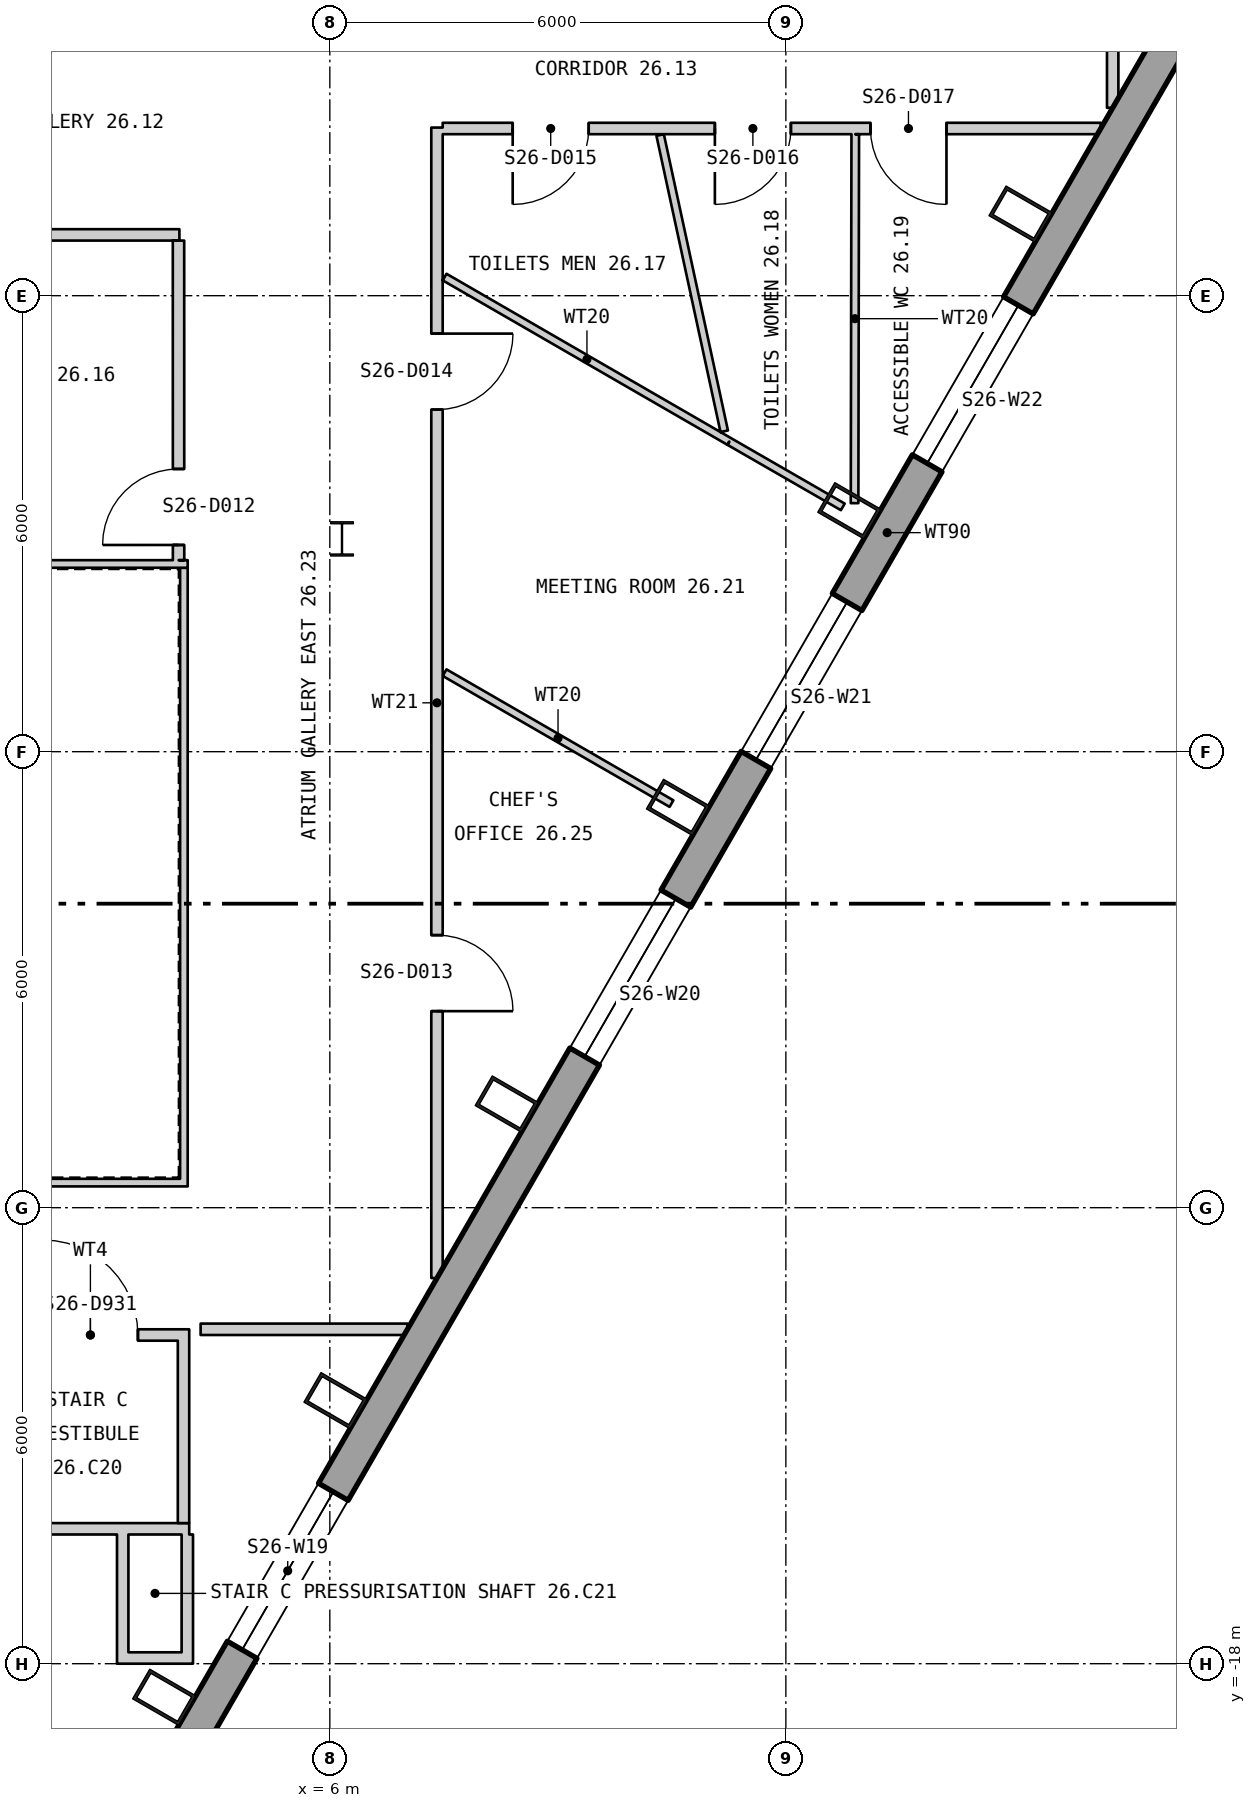
"""IFC4 building model, lengths in metres.
Left out: names, types, materials, properties, quantities, classifications, styles, units other than length and angle.
Written with IfcOpenShell. Run it as: python <this file> out.ifc"""

import sys

from ifc_helpers import new_model, si_unit, direction, frame, frame_2d, origin, origin_2d, place, context, subcontext, project, spatial, polyline, rectangle, hollow_rectangle, i_section, outline, extrude, element, fill, save


model = new_model("IFC4")
c1 = context("Model", 3, precision=1e-05, world=origin(), true_north=direction((0.0, 1.0)))
c2 = subcontext(c1, "Body", "Model", "MODEL_VIEW")
j1 = project(units=[si_unit("LENGTHUNIT", "METRE"), si_unit("PLANEANGLEUNIT", "RADIAN")], contexts=[c1])
p1 = place(None, origin())
s1 = spatial("IfcSite", under=j1, at=p1, CompositionType="ELEMENT")
p2 = place(p1, origin())
s2 = spatial("IfcBuilding", under=s1, at=p2, CompositionType="ELEMENT")
p3 = place(p2, frame((0.0, 0.0, 329.4)))
s3 = spatial("IfcBuildingStorey", under=s2, at=p3, CompositionType="ELEMENT", Elevation=329.4)
for number, where, z_axis, x_axis in (
    (1, (3.821, -18.442, 0.0), (0.0, 0.0, 1.0), (0.5, 0.866, 0.0)),
    (2, (6.075, -14.539, 0.0), (0.0, 0.0, 1.0), (0.5, 0.866, 0.0)),
    (3, (8.328, -10.636, 0.0), (0.0, 0.0, 1.0), (0.5, 0.866, 0.0)),
    (4, (10.581, -6.733, 0.0), (0.0, 0.0, 1.0), (0.5, 0.866, 0.0)),
    (5, (12.835, -2.83, 0.0), (0.0, 0.0, 1.0), (0.5, 0.866, 0.0)),
    (6, (15.088, 1.073, 0.0), (0.0, 0.0, 1.0), (0.5, 0.866, 0.0)),
):
    element("IfcColumn", number, at=place(p3, frame(where, z_axis=z_axis, x_axis=x_axis)), inside=s3, PredefinedType="COLUMN", context=c2, shape_type="SweptSolid", body=[
        extrude(hollow_rectangle(XDim=0.45, YDim=0.7, WallThickness=0.04, at=origin_2d()), origin(), (0.0, 0.0, 1.0), 4.2),
    ])
p4 = place(p3, frame((6.16, -3.2, 0.0), z_axis=(0.0, 0.0, 1.0), x_axis=(1.0, 0.0, 0.0)))
e7 = element("IfcColumn", 7, at=p4, inside=s3, PredefinedType="COLUMN", context=c2, shape_type="SweptSolid", body=[
    extrude(i_section(OverallWidth=0.3, OverallDepth=0.45, WebThickness=0.014, FlangeThickness=0.026, at=origin_2d()), origin(), (0.0, 0.0, 1.0), 4.2),
])
p5 = place(p3, frame((1.9, -22.92, -0.18), z_axis=(0.0, 0.0, 1.0), x_axis=(0.500000141277, 0.866025322218, 0.0)))
e8 = element("IfcWall", 8, at=p5, inside=s3, PredefinedType="SOLIDWALL", context=c2, shape_type="SweptSolid", body=[
    extrude(outline(polyline([(-0.13, -0.225), (45.86, -0.225), (45.6, 0.225), (0.13, 0.225), (-0.13, -0.225)])), origin(), (0.0, 0.0, 1.0), 3.98),
])
p6 = place(p5, frame((1.424, 0.0, 1.08)))
e9 = element("IfcOpeningElement", 9, at=p6, cuts=e8, PredefinedType="OPENING", context=c2, shape_type="SweptSolid", body=[
    extrude(rectangle(XDim=2.4, YDim=2.3, at=frame_2d((1.2, 1.15))), frame((0.0, 0.235, 0.0), z_axis=(0.0, -1.0, 0.0), x_axis=(1.0, 0.0, 0.0)), (0.0, 0.0, 1.0), 0.47),
])
p7 = place(p5, frame((5.892, 0.0, 1.08)))
e10 = element("IfcOpeningElement", 10, at=p7, cuts=e8, PredefinedType="OPENING", context=c2, shape_type="SweptSolid", body=[
    extrude(rectangle(XDim=2.4, YDim=2.3, at=frame_2d((1.2, 1.15))), frame((0.0, 0.235, 0.0), z_axis=(0.0, -1.0, 0.0), x_axis=(1.0, 0.0, 0.0)), (0.0, 0.0, 1.0), 0.47),
])
p8 = place(p5, frame((14.905, 0.0, 1.08)))
e11 = element("IfcOpeningElement", 11, at=p8, cuts=e8, PredefinedType="OPENING", context=c2, shape_type="SweptSolid", body=[
    extrude(rectangle(XDim=2.4, YDim=2.3, at=frame_2d((1.2, 1.15))), frame((0.0, 0.235, 0.0), z_axis=(0.0, -1.0, 0.0), x_axis=(1.0, 0.0, 0.0)), (0.0, 0.0, 1.0), 0.47),
])
p9 = place(p5, frame((19.412, 0.0, 1.08)))
e12 = element("IfcOpeningElement", 12, at=p9, cuts=e8, PredefinedType="OPENING", context=c2, shape_type="SweptSolid", body=[
    extrude(rectangle(XDim=2.4, YDim=2.3, at=frame_2d((1.2, 1.15))), frame((0.0, 0.235, 0.0), z_axis=(0.0, -1.0, 0.0), x_axis=(1.0, 0.0, 0.0)), (0.0, 0.0, 1.0), 0.47),
])
p10 = place(p5, frame((23.918, 0.0, 1.08)))
e13 = element("IfcOpeningElement", 13, at=p10, cuts=e8, PredefinedType="OPENING", context=c2, shape_type="SweptSolid", body=[
    extrude(rectangle(XDim=2.4, YDim=2.3, at=frame_2d((1.2, 1.15))), frame((0.0, 0.235, 0.0), z_axis=(0.0, -1.0, 0.0), x_axis=(1.0, 0.0, 0.0)), (0.0, 0.0, 1.0), 0.47),
])
p11 = place(p5, frame((32.932, 0.0, 1.08)))
e14 = element("IfcOpeningElement", 14, at=p11, cuts=e8, PredefinedType="OPENING", context=c2, shape_type="SweptSolid", body=[
    extrude(rectangle(XDim=2.4, YDim=2.3, at=frame_2d((1.2, 1.15))), frame((0.0, 0.235, 0.0), z_axis=(0.0, -1.0, 0.0), x_axis=(1.0, 0.0, 0.0)), (0.0, 0.0, 1.0), 0.47),
])
p12 = place(p5, frame((37.438, 0.0, 1.08)))
e15 = element("IfcOpeningElement", 15, at=p12, cuts=e8, PredefinedType="OPENING", context=c2, shape_type="SweptSolid", body=[
    extrude(rectangle(XDim=2.4, YDim=2.3, at=frame_2d((1.2, 1.15))), frame((0.0, 0.235, 0.0), z_axis=(0.0, -1.0, 0.0), x_axis=(1.0, 0.0, 0.0)), (0.0, 0.0, 1.0), 0.47),
])
p13 = place(p5, frame((41.907, 0.0, 1.08)))
e16 = element("IfcOpeningElement", 16, at=p13, cuts=e8, PredefinedType="OPENING", context=c2, shape_type="SweptSolid", body=[
    extrude(rectangle(XDim=2.4, YDim=2.3, at=frame_2d((1.2, 1.15))), frame((0.0, 0.235, 0.0), z_axis=(0.0, -1.0, 0.0), x_axis=(1.0, 0.0, 0.0)), (0.0, 0.0, 1.0), 0.47),
])
p14 = place(p3, frame((-4.13, -11.67, 0.0), z_axis=(0.0, 0.0, 1.0), x_axis=(1.0, 0.0, 0.0)))
e17 = element("IfcWall", 17, at=p14, inside=s3, PredefinedType="PARTITIONING", context=c2, shape_type="SweptSolid", body=[
    extrude(rectangle(XDim=8.26, YDim=0.1, at=frame_2d((4.13, 0.0))), origin(), (0.0, 0.0, 1.0), 4.0),
])
p15 = place(p3, frame((4.08, -11.62, 0.0), z_axis=(0.0, 0.0, 1.0), x_axis=(0.0, 1.0, 0.0)))
e18 = element("IfcWall", 18, at=p15, inside=s3, PredefinedType="PARTITIONING", context=c2, shape_type="SweptSolid", body=[
    extrude(rectangle(XDim=8.04, YDim=0.1, at=frame_2d((4.02, 0.0))), origin(), (0.0, 0.0, 1.0), 4.0),
])
p16 = place(p3, frame((4.13, -3.53, 0.0), z_axis=(0.0, 0.0, 1.0), x_axis=(-1.0, 0.0, 0.0)))
e19 = element("IfcWall", 19, at=p16, inside=s3, PredefinedType="PARTITIONING", context=c2, shape_type="SweptSolid", body=[
    extrude(rectangle(XDim=8.26, YDim=0.1, at=frame_2d((4.13, 0.0))), origin(), (0.0, 0.0, 1.0), 4.0),
])
p17 = place(p3, frame((1.55, -16.225, 0.0), z_axis=(0.0, 0.0, 1.0), x_axis=(1.0, 0.0, 0.0)))
e20 = element("IfcWall", 20, at=p17, inside=s3, PredefinedType="PARTITIONING", context=c2, shape_type="SweptSolid", body=[
    extrude(rectangle(XDim=2.6, YDim=0.15, at=frame_2d((1.3, 0.0))), origin(), (0.0, 0.0, 1.0), 4.0),
])
p18 = place(p3, frame((4.075, -16.15, 0.0), z_axis=(0.0, 0.0, 1.0), x_axis=(0.0, 1.0, 0.0)))
e21 = element("IfcWall", 21, at=p18, inside=s3, PredefinedType="PARTITIONING", context=c2, shape_type="SweptSolid", body=[
    extrude(rectangle(XDim=2.4, YDim=0.15, at=frame_2d((1.2, 0.0))), origin(), (0.0, 0.0, 1.0), 4.0),
])
p19 = place(p3, frame((1.55, -13.675, 0.0), z_axis=(0.0, 0.0, 1.0), x_axis=(1.0, 0.0, 0.0)))
e22 = element("IfcWall", 22, at=p19, inside=s3, PredefinedType="PARTITIONING", context=c2, shape_type="SweptSolid", body=[
    extrude(rectangle(XDim=2.6, YDim=0.15, at=frame_2d((1.3, 0.0))), origin(), (0.0, 0.0, 1.0), 3.21),
])
p20 = place(p19, frame((0.675, 0.0, 0.0)))
e23 = element("IfcOpeningElement", 23, at=p20, cuts=e22, PredefinedType="OPENING", context=c2, shape_type="SweptSolid", body=[
    extrude(rectangle(XDim=1.25, YDim=2.1, at=frame_2d((0.625, 1.05))), frame((0.0, 0.085, 0.0), z_axis=(0.0, -1.0, 0.0), x_axis=(1.0, 0.0, 0.0)), (0.0, 0.0, 1.0), 0.17),
])
p21 = place(p3, frame((3.275, -18.0, 0.0), z_axis=(0.0, 0.0, 1.0), x_axis=(0.0, 1.0, 0.0)))
e24 = element("IfcWall", 24, at=p21, inside=s3, PredefinedType="PARTITIONING", context=c2, shape_type="SweptSolid", body=[
    extrude(rectangle(XDim=1.7, YDim=0.15, at=frame_2d((0.85, 0.0))), origin(), (0.0, 0.0, 1.0), 3.55),
])
p22 = place(p3, frame((3.35, -17.925, 0.0), z_axis=(0.0, 0.0, 1.0), x_axis=(1.0, 0.0, 0.0)))
e25 = element("IfcWall", 25, at=p22, inside=s3, PredefinedType="PARTITIONING", context=c2, shape_type="SweptSolid", body=[
    extrude(rectangle(XDim=0.7, YDim=0.15, at=frame_2d((0.35, 0.0))), origin(), (0.0, 0.0, 1.0), 4.0),
])
p23 = place(p3, frame((4.125, -18.0, 0.0), z_axis=(0.0, 0.0, 1.0), x_axis=(0.0, 1.0, 0.0)))
e26 = element("IfcWall", 26, at=p23, inside=s3, PredefinedType="PARTITIONING", context=c2, shape_type="SweptSolid", body=[
    extrude(rectangle(XDim=1.7, YDim=0.15, at=frame_2d((0.85, 0.0))), origin(), (0.0, 0.0, 1.0), 4.0),
])
p24 = place(p3, frame((-4.022, 0.8, 0.0), z_axis=(0.0, 0.0, 1.0), x_axis=(1.0, 0.0, 0.0)))
e27 = element("IfcWall", 27, at=p24, inside=s3, PredefinedType="PARTITIONING", context=c2, shape_type="SweptSolid", body=[
    extrude(rectangle(XDim=8.043, YDim=0.15, at=frame_2d((4.021, 0.0))), origin(), (0.0, 0.0, 1.0), 4.0),
])
p25 = place(p3, frame((4.009, 0.725, 0.0), z_axis=(0.0, 0.0, 1.0), x_axis=(0.000237812122, -0.999999971723, 0.0)))
e28 = element("IfcWall", 28, at=p25, inside=s3, PredefinedType="PARTITIONING", context=c2, shape_type="SweptSolid", body=[
    extrude(rectangle(XDim=4.205, YDim=0.15, at=frame_2d((2.103, 0.0))), origin(), (0.0, 0.0, 1.0), 4.0),
])
p26 = place(p25, frame((3.005, 0.0, 0.0)))
e29 = element("IfcOpeningElement", 29, at=p26, cuts=e28, PredefinedType="OPENING", context=c2, shape_type="SweptSolid", body=[
    extrude(rectangle(XDim=1.0, YDim=2.1, at=frame_2d((0.5, 1.05))), frame((0.0, 0.085, 0.0), z_axis=(0.0, -1.0, 0.0), x_axis=(1.0, 0.0, 0.0)), (0.0, 0.0, 1.0), 0.17),
])
p27 = place(p3, frame((4.3, -13.6, 0.0), z_axis=(0.0, 0.0, 1.0), x_axis=(1.0, 0.0, 0.0)))
e30 = element("IfcWall", 30, at=p27, inside=s3, PredefinedType="PARTITIONING", context=c2, shape_type="SweptSolid", body=[
    extrude(rectangle(XDim=2.115, YDim=0.15, at=frame_2d((1.058, 0.0))), origin(), (0.0, 0.0, 1.0), 3.21),
])
p28 = place(p3, frame((6.415, -13.6, 0.0), z_axis=(0.0, 0.0, 1.0), x_axis=(1.0, 0.0, 0.0)))
e31 = element("IfcWall", 31, at=p28, inside=s3, PredefinedType="PARTITIONING", context=c2, shape_type="SweptSolid", body=[
    extrude(rectangle(XDim=0.606, YDim=0.15, at=frame_2d((0.303, 0.0))), origin(), (0.0, 0.0, 1.0), 4.0),
])
p29 = place(p3, frame((7.41, -12.926, 0.0), z_axis=(0.0, 0.0, 1.0), x_axis=(0.0, 1.0, 0.0)))
e32 = element("IfcWall", 32, at=p29, inside=s3, PredefinedType="PARTITIONING", context=c2, shape_type="SweptSolid", body=[
    extrude(rectangle(XDim=15.138, YDim=0.15, at=frame_2d((7.569, 0.0))), origin(), (0.0, 0.0, 1.0), 4.0),
])
p30 = place(p29, frame((3.512, 0.0, 0.0)))
e33 = element("IfcOpeningElement", 33, at=p30, cuts=e32, PredefinedType="OPENING", context=c2, shape_type="SweptSolid", body=[
    extrude(rectangle(XDim=1.0, YDim=2.1, at=frame_2d((0.5, 1.05))), frame((0.0, 0.085, 0.0), z_axis=(0.0, -1.0, 0.0), x_axis=(1.0, 0.0, 0.0)), (0.0, 0.0, 1.0), 0.17),
])
p31 = place(p29, frame((11.427, 0.0, 0.0)))
e34 = element("IfcOpeningElement", 34, at=p31, cuts=e32, PredefinedType="OPENING", context=c2, shape_type="SweptSolid", body=[
    extrude(rectangle(XDim=1.0, YDim=2.1, at=frame_2d((0.5, 1.05))), frame((0.0, 0.085, 0.0), z_axis=(0.0, -1.0, 0.0), x_axis=(1.0, 0.0, 0.0)), (0.0, 0.0, 1.0), 0.17),
])
p32 = place(p3, frame((7.485, 2.2, 0.0), z_axis=(0.0, 0.0, 1.0), x_axis=(1.0, 0.0, 0.0)))
e35 = element("IfcWall", 35, at=p32, inside=s3, PredefinedType="PARTITIONING", context=c2, shape_type="SweptSolid", body=[
    extrude(rectangle(XDim=8.658, YDim=0.15, at=frame_2d((4.329, 0.0))), origin(), (0.0, 0.0, 1.0), 4.0),
])
p33 = place(p32, frame((0.921, 0.0, 0.0)))
e36 = element("IfcOpeningElement", 36, at=p33, cuts=e35, PredefinedType="OPENING", context=c2, shape_type="SweptSolid", body=[
    extrude(rectangle(XDim=1.0, YDim=2.1, at=frame_2d((0.5, 1.05))), frame((0.0, 0.085, 0.0), z_axis=(0.0, -1.0, 0.0), x_axis=(1.0, 0.0, 0.0)), (0.0, 0.0, 1.0), 0.17),
])
p34 = place(p32, frame((3.581, 0.0, 0.0)))
e37 = element("IfcOpeningElement", 37, at=p34, cuts=e35, PredefinedType="OPENING", context=c2, shape_type="SweptSolid", body=[
    extrude(rectangle(XDim=1.0, YDim=2.1, at=frame_2d((0.5, 1.05))), frame((0.0, 0.085, 0.0), z_axis=(0.0, -1.0, 0.0), x_axis=(1.0, 0.0, 0.0)), (0.0, 0.0, 1.0), 0.17),
])
p35 = place(p32, frame((5.628, 0.0, 0.0)))
e38 = element("IfcOpeningElement", 38, at=p35, cuts=e35, PredefinedType="OPENING", context=c2, shape_type="SweptSolid", body=[
    extrude(rectangle(XDim=1.0, YDim=2.1, at=frame_2d((0.5, 1.05))), frame((0.0, 0.085, 0.0), z_axis=(0.0, -1.0, 0.0), x_axis=(1.0, 0.0, 0.0)), (0.0, 0.0, 1.0), 0.17),
])
p36 = place(p3, frame((7.51, -4.96, 0.0), z_axis=(0.0, 0.0, 1.0), x_axis=(0.866074466908, -0.499915010547, 0.0)))
e39 = element("IfcWall", 39, at=p36, inside=s3, PredefinedType="PARTITIONING", context=c2, shape_type="SweptSolid", body=[
    extrude(rectangle(XDim=3.447, YDim=0.1, at=frame_2d((1.723, 0.0))), origin(), (0.0, 0.0, 1.0), 4.0),
])
p37 = place(p3, frame((7.51, 0.245, 0.0), z_axis=(0.0, 0.0, 1.0), x_axis=(0.865900672614, -0.50021597852, 0.0)))
e40 = element("IfcWall", 40, at=p37, inside=s3, PredefinedType="PARTITIONING", context=c2, shape_type="SweptSolid", body=[
    extrude(rectangle(XDim=4.326, YDim=0.1, at=frame_2d((2.163, 0.0))), origin(), (0.0, 0.0, 1.0), 4.0),
])
p38 = place(p3, frame((10.346, 2.114, 0.0), z_axis=(0.0, 0.0, 1.0), x_axis=(0.211378111895, -0.977404365558, 0.0)))
e41 = element("IfcWall", 41, at=p38, inside=s3, PredefinedType="PARTITIONING", context=c2, shape_type="SweptSolid", body=[
    extrude(rectangle(XDim=3.988, YDim=0.1, at=frame_2d((1.994, 0.0))), origin(), (0.0, 0.0, 1.0), 4.0),
])
p39 = place(p3, frame((11.256, -1.919, 0.0), z_axis=(0.0, 0.0, 1.0), x_axis=(0.866523573279, -0.499136150717, 0.0)))
e42 = element("IfcWall", 42, at=p39, inside=s3, PredefinedType="PARTITIONING", context=c2, shape_type="SweptSolid", body=[
    extrude(rectangle(XDim=1.723, YDim=0.1, at=frame_2d((0.862, 0.0))), origin(), (0.0, 0.0, 1.0), 4.0),
])
p40 = place(p3, frame((12.904, -2.73, 0.0), z_axis=(0.0, 0.0, 1.0), x_axis=(0.001853755826, 0.999998281793, 0.0)))
e43 = element("IfcWall", 43, at=p40, inside=s3, PredefinedType="PARTITIONING", context=c2, shape_type="SweptSolid", body=[
    extrude(rectangle(XDim=4.855, YDim=0.1, at=frame_2d((2.428, 0.0))), origin(), (0.0, 0.0, 1.0), 4.0),
])
p41 = place(p3, frame((16.3, 2.472, 0.0), z_axis=(0.0, 0.0, 1.0), x_axis=(0.0, 1.0, 0.0)))
e44 = element("IfcWall", 44, at=p41, inside=s3, PredefinedType="PARTITIONING", context=c2, shape_type="SweptSolid", body=[
    extrude(rectangle(XDim=17.276, YDim=0.15, at=frame_2d((8.638, 0.0))), origin(), (0.0, 0.0, 1.0), 4.0),
])
p42 = place(p41, frame((5.01, 0.0, 0.0)))
e45 = element("IfcOpeningElement", 45, at=p42, cuts=e44, PredefinedType="OPENING", context=c2, shape_type="SweptSolid", body=[
    extrude(rectangle(XDim=1.0, YDim=2.1, at=frame_2d((0.5, 1.05))), frame((0.0, 0.085, 0.0), z_axis=(0.0, -1.0, 0.0), x_axis=(1.0, 0.0, 0.0)), (0.0, 0.0, 1.0), 0.17),
])
p43 = place(p41, frame((13.423, 0.0, 0.0)))
e46 = element("IfcOpeningElement", 46, at=p43, cuts=e44, PredefinedType="OPENING", context=c2, shape_type="SweptSolid", body=[
    extrude(rectangle(XDim=1.8, YDim=2.1, at=frame_2d((0.9, 1.05))), frame((0.0, 0.085, 0.0), z_axis=(0.0, -1.0, 0.0), x_axis=(1.0, 0.0, 0.0)), (0.0, 0.0, 1.0), 0.17),
])
p44 = place(p7, origin())
e47 = element("IfcWindow", 47, at=p44, inside=s3, PartitioningType="SINGLE_PANEL", PredefinedType="WINDOW", context=c2, shape_type="SweptSolid", body=[
    extrude(rectangle(XDim=2.4, YDim=2.3, at=frame_2d((1.2, 1.15))), frame((0.0, 0.105, 0.0), z_axis=(0.0, -1.0, 0.0), x_axis=(1.0, 0.0, 0.0)), (0.0, 0.0, 1.0), 0.06),
])
fill(e10, e47)
p45 = place(p8, origin())
e48 = element("IfcWindow", 48, at=p45, inside=s3, PartitioningType="SINGLE_PANEL", PredefinedType="WINDOW", context=c2, shape_type="SweptSolid", body=[
    extrude(rectangle(XDim=2.4, YDim=2.3, at=frame_2d((1.2, 1.15))), frame((0.0, 0.105, 0.0), z_axis=(0.0, -1.0, 0.0), x_axis=(1.0, 0.0, 0.0)), (0.0, 0.0, 1.0), 0.06),
])
fill(e11, e48)
p46 = place(p9, origin())
e49 = element("IfcWindow", 49, at=p46, inside=s3, PartitioningType="SINGLE_PANEL", PredefinedType="WINDOW", context=c2, shape_type="SweptSolid", body=[
    extrude(rectangle(XDim=2.4, YDim=2.3, at=frame_2d((1.2, 1.15))), frame((0.0, 0.105, 0.0), z_axis=(0.0, -1.0, 0.0), x_axis=(1.0, 0.0, 0.0)), (0.0, 0.0, 1.0), 0.06),
])
fill(e12, e49)
p47 = place(p10, origin())
e50 = element("IfcWindow", 50, at=p47, inside=s3, PartitioningType="SINGLE_PANEL", PredefinedType="WINDOW", context=c2, shape_type="SweptSolid", body=[
    extrude(rectangle(XDim=2.4, YDim=2.3, at=frame_2d((1.2, 1.15))), frame((0.0, 0.105, 0.0), z_axis=(0.0, -1.0, 0.0), x_axis=(1.0, 0.0, 0.0)), (0.0, 0.0, 1.0), 0.06),
])
fill(e13, e50)
p48 = place(p20, origin())
e51 = element("IfcDoor", 51, at=p48, inside=s3, OperationType="SINGLE_SWING_RIGHT", PredefinedType="DOOR", context=c2, shape_type="SweptSolid", body=[
    extrude(rectangle(XDim=1.25, YDim=2.1, at=frame_2d((0.625, 1.05))), frame((0.0, 0.025, 0.0), z_axis=(0.0, -1.0, 0.0), x_axis=(1.0, 0.0, 0.0)), (0.0, 0.0, 1.0), 0.05),
])
fill(e23, e51)
p49 = place(p26, origin())
e52 = element("IfcDoor", 52, at=p49, inside=s3, OperationType="SINGLE_SWING_RIGHT", PredefinedType="DOOR", context=c2, shape_type="SweptSolid", body=[
    extrude(rectangle(XDim=1.0, YDim=2.1, at=frame_2d((0.5, 1.05))), frame((0.0, 0.025, 0.0), z_axis=(0.0, -1.0, 0.0), x_axis=(1.0, 0.0, 0.0)), (0.0, 0.0, 1.0), 0.05),
])
fill(e29, e52)
p50 = place(p30, origin())
e53 = element("IfcDoor", 53, at=p50, inside=s3, OperationType="SINGLE_SWING_LEFT", PredefinedType="DOOR", context=c2, shape_type="SweptSolid", body=[
    extrude(rectangle(XDim=1.0, YDim=2.1, at=frame_2d((0.5, 1.05))), frame((0.0, 0.025, 0.0), z_axis=(0.0, -1.0, 0.0), x_axis=(1.0, 0.0, 0.0)), (0.0, 0.0, 1.0), 0.05),
])
fill(e33, e53)
p51 = place(p31, origin())
e54 = element("IfcDoor", 54, at=p51, inside=s3, OperationType="SINGLE_SWING_RIGHT", PredefinedType="DOOR", context=c2, shape_type="SweptSolid", body=[
    extrude(rectangle(XDim=1.0, YDim=2.1, at=frame_2d((0.5, 1.05))), frame((0.0, 0.025, 0.0), z_axis=(0.0, -1.0, 0.0), x_axis=(1.0, 0.0, 0.0)), (0.0, 0.0, 1.0), 0.05),
])
fill(e34, e54)
p52 = place(p33, origin())
e55 = element("IfcDoor", 55, at=p52, inside=s3, OperationType="SINGLE_SWING_LEFT", PredefinedType="DOOR", context=c2, shape_type="SweptSolid", body=[
    extrude(rectangle(XDim=1.0, YDim=2.1, at=frame_2d((0.5, 1.05))), frame((0.0, 0.025, 0.0), z_axis=(0.0, -1.0, 0.0), x_axis=(1.0, 0.0, 0.0)), (0.0, 0.0, 1.0), 0.05),
])
fill(e36, e55)
p53 = place(p34, origin())
e56 = element("IfcDoor", 56, at=p53, inside=s3, OperationType="SINGLE_SWING_LEFT", PredefinedType="DOOR", context=c2, shape_type="SweptSolid", body=[
    extrude(rectangle(XDim=1.0, YDim=2.1, at=frame_2d((0.5, 1.05))), frame((0.0, 0.025, 0.0), z_axis=(0.0, -1.0, 0.0), x_axis=(1.0, 0.0, 0.0)), (0.0, 0.0, 1.0), 0.05),
])
fill(e37, e56)
p54 = place(p35, origin())
e57 = element("IfcDoor", 57, at=p54, inside=s3, OperationType="SINGLE_SWING_RIGHT", PredefinedType="DOOR", context=c2, shape_type="SweptSolid", body=[
    extrude(rectangle(XDim=1.0, YDim=2.1, at=frame_2d((0.5, 1.05))), frame((0.0, 0.025, 0.0), z_axis=(0.0, -1.0, 0.0), x_axis=(1.0, 0.0, 0.0)), (0.0, 0.0, 1.0), 0.05),
])
fill(e38, e57)
save(model, sys.argv[1])
